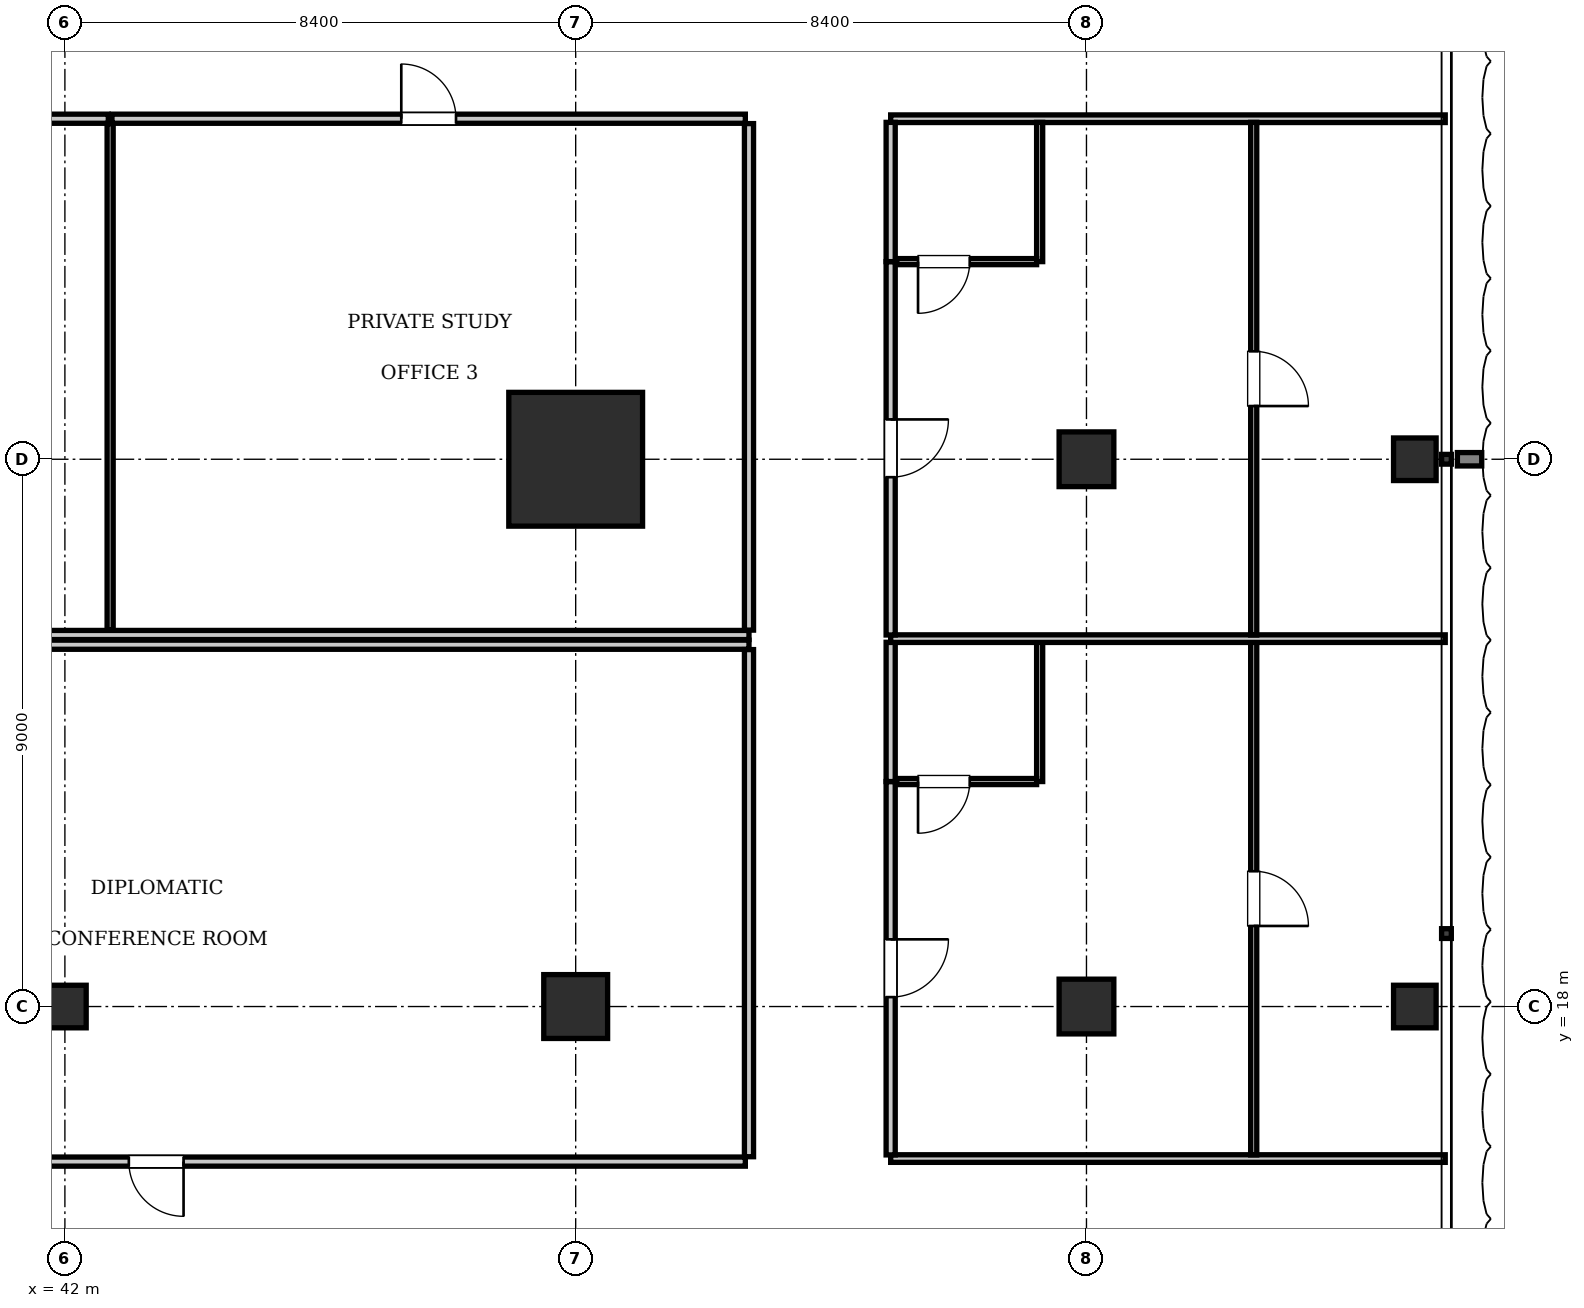
"""IFC4 building model, lengths in metres.
Left out: names, types, materials, properties, quantities, classifications, styles, units other than length and angle.
Written with IfcOpenShell. Run it as: python <this file> out.ifc"""

import sys

from ifc_helpers import new_model, si_unit, direction, frame, frame_2d, origin, origin_2d, place, context, subcontext, project, spatial, rectangle, i_section, extrude, element, fill, save


model = new_model("IFC4")
c1 = context("Model", 3, precision=1e-05, world=origin(), true_north=direction((0.0, 1.0)))
c2 = subcontext(c1, "Body", "Model", "MODEL_VIEW")
j1 = project(units=[si_unit("LENGTHUNIT", "METRE"), si_unit("PLANEANGLEUNIT", "RADIAN")], contexts=[c1])
p1 = place(None, origin())
s1 = spatial("IfcSite", under=j1, at=p1, CompositionType="ELEMENT")
p2 = place(p1, origin())
s2 = spatial("IfcBuilding", under=s1, at=p2, CompositionType="ELEMENT")
p3 = place(p2, frame((0.0, 0.0, 65.45)))
s3 = spatial("IfcBuildingStorey", under=s2, at=p3, CompositionType="ELEMENT", Elevation=65.45)
p4 = place(p3, frame((50.4, 27.0, 0.0), z_axis=(0.0, 0.0, 1.0), x_axis=(1.0, 0.0, 0.0)))
e1 = element("IfcColumn", 1, at=p4, inside=s3, PredefinedType="COLUMN", context=c2, shape_type="SweptSolid", body=[
    extrude(rectangle(XDim=2.2, YDim=2.2, at=origin_2d()), origin(), (0.0, 0.0, 1.0), 3.85),
])
p5 = place(p3, frame((50.4, 18.0, 0.0), z_axis=(0.0, 0.0, 1.0), x_axis=(1.0, 0.0, 0.0)))
e2 = element("IfcColumn", 2, at=p5, inside=s3, PredefinedType="COLUMN", context=c2, shape_type="SweptSolid", body=[
    extrude(rectangle(XDim=1.05, YDim=1.05, at=origin_2d()), origin(), (0.0, 0.0, 1.0), 3.85),
])
p6 = place(p3, frame((42.0, 18.0, 0.0), z_axis=(0.0, 0.0, 1.0), x_axis=(1.0, 0.0, 0.0)))
e3 = element("IfcColumn", 3, at=p6, inside=s3, PredefinedType="COLUMN", context=c2, shape_type="SweptSolid", body=[
    extrude(i_section(OverallWidth=0.7, OverallDepth=0.7, WebThickness=0.028, FlangeThickness=0.044, at=origin_2d()), origin(), (0.0, 0.0, 1.0), 3.85),
])
for number, where, z_axis, x_axis in (
    (4, (58.8, 18.0, 0.0), (0.0, 0.0, 1.0), (1.0, 0.0, 0.0)),
    (5, (58.8, 27.0, 0.0), (0.0, 0.0, 1.0), (1.0, 0.0, 0.0)),
):
    element("IfcColumn", number, at=place(p3, frame(where, z_axis=z_axis, x_axis=x_axis)), inside=s3, PredefinedType="COLUMN", context=c2, shape_type="SweptSolid", body=[
        extrude(rectangle(XDim=0.9, YDim=0.9, at=origin_2d()), origin(), (0.0, 0.0, 1.0), 3.85),
    ])
for number, where, z_axis, x_axis in (
    (6, (64.2, 18.0, 0.0), (0.0, 0.0, 1.0), (1.0, 0.0, 0.0)),
    (7, (64.2, 27.0, 0.0), (0.0, 0.0, 1.0), (1.0, 0.0, 0.0)),
):
    element("IfcColumn", number, at=place(p3, frame(where, z_axis=z_axis, x_axis=x_axis)), inside=s3, PredefinedType="COLUMN", context=c2, shape_type="SweptSolid", body=[
        extrude(i_section(OverallWidth=0.7, OverallDepth=0.7, WebThickness=0.028, FlangeThickness=0.044, at=origin_2d()), origin(), (0.0, 0.0, 1.0), 3.85),
    ])
p7 = place(p3, frame((22.35, 24.11, 0.0), z_axis=(0.0, 0.0, 1.0), x_axis=(1.0, 0.0, 0.0)))
e8 = element("IfcWall", 8, at=p7, inside=s3, PredefinedType="PARTITIONING", context=c2, shape_type="SweptSolid", body=[
    extrude(rectangle(XDim=30.9, YDim=0.15, at=frame_2d((15.45, 0.0))), origin(), (0.0, 0.0, 1.0), 3.61),
])
p8 = place(p3, frame((53.25, 24.19, 0.0), z_axis=(0.0, 0.0, 1.0), x_axis=(0.0, 1.0, 0.0)))
e9 = element("IfcWall", 9, at=p8, inside=s3, PredefinedType="PARTITIONING", context=c2, shape_type="SweptSolid", body=[
    extrude(rectangle(XDim=8.33, YDim=0.15, at=frame_2d((4.165, 0.0))), origin(), (0.0, 0.0, 1.0), 3.61),
])
p9 = place(p3, frame((34.122, 32.6, 0.0), z_axis=(0.0, 0.0, 1.0), x_axis=(1.0, 0.0, 0.0)))
e10 = element("IfcWall", 10, at=p9, inside=s3, PredefinedType="PARTITIONING", context=c2, shape_type="SweptSolid", body=[
    extrude(rectangle(XDim=8.592, YDim=0.15, at=frame_2d((4.296, 0.0))), origin(), (0.0, 0.0, 1.0), 3.61),
])
p10 = place(p9, frame((3.846, 0.0, 0.0)))
e11 = element("IfcOpeningElement", 11, at=p10, cuts=e10, PredefinedType="OPENING", context=c2, shape_type="SweptSolid", body=[
    extrude(rectangle(XDim=0.9, YDim=2.1, at=frame_2d((0.45, 1.05))), frame((0.0, 0.085, 0.0), z_axis=(0.0, -1.0, 0.0), x_axis=(1.0, 0.0, 0.0)), (0.0, 0.0, 1.0), 0.17),
])
p11 = place(p3, frame((42.744, 24.19, 0.0), z_axis=(0.0, 0.0, 1.0), x_axis=(0.0, 1.0, 0.0)))
e12 = element("IfcWall", 12, at=p11, inside=s3, PredefinedType="PARTITIONING", context=c2, shape_type="SweptSolid", body=[
    extrude(rectangle(XDim=8.33, YDim=0.1, at=frame_2d((4.165, 0.0))), origin(), (0.0, 0.0, 1.0), 3.61),
])
p12 = place(p3, frame((42.774, 32.6, 0.0), z_axis=(0.0, 0.0, 1.0), x_axis=(1.0, 0.0, 0.0)))
e13 = element("IfcWall", 13, at=p12, inside=s3, PredefinedType="PARTITIONING", context=c2, shape_type="SweptSolid", body=[
    extrude(rectangle(XDim=10.416, YDim=0.15, at=frame_2d((5.208, 0.0))), origin(), (0.0, 0.0, 1.0), 3.61),
])
p13 = place(p12, frame((4.758, 0.0, 0.0)))
e14 = element("IfcOpeningElement", 14, at=p13, cuts=e13, PredefinedType="OPENING", context=c2, shape_type="SweptSolid", body=[
    extrude(rectangle(XDim=0.9, YDim=2.1, at=frame_2d((0.45, 1.05))), frame((0.0, 0.085, 0.0), z_axis=(0.0, -1.0, 0.0), x_axis=(1.0, 0.0, 0.0)), (0.0, 0.0, 1.0), 0.17),
])
p14 = place(p3, frame((22.35, 23.95, 0.0), z_axis=(0.0, 0.0, 1.0), x_axis=(1.0, 0.0, 0.0)))
e15 = element("IfcWall", 15, at=p14, inside=s3, PredefinedType="PARTITIONING", context=c2, shape_type="SweptSolid", body=[
    extrude(rectangle(XDim=30.9, YDim=0.15, at=frame_2d((15.45, 0.0))), origin(), (0.0, 0.0, 1.0), 3.61),
])
p15 = place(p3, frame((53.25, 15.53, 0.0), z_axis=(0.0, 0.0, 1.0), x_axis=(0.0, 1.0, 0.0)))
e16 = element("IfcWall", 16, at=p15, inside=s3, PredefinedType="PARTITIONING", context=c2, shape_type="SweptSolid", body=[
    extrude(rectangle(XDim=8.34, YDim=0.15, at=frame_2d((4.17, 0.0))), origin(), (0.0, 0.0, 1.0), 3.61),
])
p16 = place(p3, frame((33.813, 15.45, 0.0), z_axis=(0.0, 0.0, 1.0), x_axis=(1.0, 0.0, 0.0)))
e17 = element("IfcWall", 17, at=p16, inside=s3, PredefinedType="PARTITIONING", context=c2, shape_type="SweptSolid", body=[
    extrude(rectangle(XDim=19.377, YDim=0.15, at=frame_2d((9.688, 0.0))), origin(), (0.0, 0.0, 1.0), 3.61),
])
p17 = place(p16, frame((9.239, 0.0, 0.0)))
e18 = element("IfcOpeningElement", 18, at=p17, cuts=e17, PredefinedType="OPENING", context=c2, shape_type="SweptSolid", body=[
    extrude(rectangle(XDim=0.9, YDim=2.1, at=frame_2d((0.45, 1.05))), frame((0.0, 0.085, 0.0), z_axis=(0.0, -1.0, 0.0), x_axis=(1.0, 0.0, 0.0)), (0.0, 0.0, 1.0), 0.17),
])
for number, where, z_axis, x_axis in (
    (19, (55.58, 15.5, 0.0), (0.0, 0.0, 1.0), (1.0, 0.0, 0.0)),
    (20, (55.58, 32.6, 0.0), (0.0, 0.0, 1.0), (1.0, 0.0, 0.0)),
):
    element("IfcWall", number, at=place(p3, frame(where, z_axis=z_axis, x_axis=x_axis)), inside=s3, PredefinedType="PARTITIONING", context=c2, shape_type="SweptSolid", body=[
        extrude(rectangle(XDim=9.12, YDim=0.125, at=frame_2d((4.56, 0.0))), origin(), (0.0, 0.0, 1.0), 3.61),
    ])
p18 = place(p3, frame((55.58, 15.56, 0.0), z_axis=(0.0, 0.0, 1.0), x_axis=(0.0, 1.0, 0.0)))
e21 = element("IfcWall", 21, at=p18, inside=s3, PredefinedType="PARTITIONING", context=c2, shape_type="SweptSolid", body=[
    extrude(rectangle(XDim=6.14, YDim=0.15, at=frame_2d((3.07, 0.0))), origin(), (0.0, 0.0, 1.0), 3.61),
])
p19 = place(p18, frame((2.595, 0.0, 0.0)))
e22 = element("IfcOpeningElement", 22, at=p19, cuts=e21, PredefinedType="OPENING", context=c2, shape_type="SweptSolid", body=[
    extrude(rectangle(XDim=0.95, YDim=2.15, at=frame_2d((0.475, 1.075))), frame((0.0, 0.085, 0.0), z_axis=(0.0, -1.0, 0.0), x_axis=(1.0, 0.0, 0.0)), (0.0, 0.0, 1.0), 0.17),
])
p20 = place(p3, frame((55.58, 21.7, 0.0), z_axis=(0.0, 0.0, 1.0), x_axis=(0.0, 1.0, 0.0)))
e23 = element("IfcWall", 23, at=p20, inside=s3, PredefinedType="PARTITIONING", context=c2, shape_type="SweptSolid", body=[
    extrude(rectangle(XDim=2.29, YDim=0.15, at=frame_2d((1.145, 0.0))), origin(), (0.0, 0.0, 1.0), 3.61),
])
p21 = place(p3, frame((58.03, 21.7, 0.0), z_axis=(0.0, 0.0, 1.0), x_axis=(0.0, 1.0, 0.0)))
e24 = element("IfcWall", 24, at=p21, inside=s3, PredefinedType="PARTITIONING", context=c2, shape_type="SweptSolid", body=[
    extrude(rectangle(XDim=2.29, YDim=0.1, at=frame_2d((1.145, 0.0))), origin(), (0.0, 0.0, 1.0), 3.61),
])
p22 = place(p3, frame((55.68, 21.7, 0.0), z_axis=(0.0, 0.0, 1.0), x_axis=(1.0, 0.0, 0.0)))
e25 = element("IfcWall", 25, at=p22, inside=s3, PredefinedType="PARTITIONING", context=c2, shape_type="SweptSolid", body=[
    extrude(rectangle(XDim=2.3, YDim=0.1, at=frame_2d((1.15, 0.0))), origin(), (0.0, 0.0, 1.0), 3.61),
])
p23 = place(p22, frame((0.35, 0.0, 0.0)))
e26 = element("IfcOpeningElement", 26, at=p23, cuts=e25, PredefinedType="OPENING", context=c2, shape_type="SweptSolid", body=[
    extrude(rectangle(XDim=0.85, YDim=2.1, at=frame_2d((0.425, 1.05))), frame((0.0, 0.06, 0.0), z_axis=(0.0, -1.0, 0.0), x_axis=(1.0, 0.0, 0.0)), (0.0, 0.0, 1.0), 0.12),
])
p24 = place(p3, frame((61.55, 15.56, 0.0), z_axis=(0.0, 0.0, 1.0), x_axis=(0.0, 1.0, 0.0)))
e27 = element("IfcWall", 27, at=p24, inside=s3, PredefinedType="PARTITIONING", context=c2, shape_type="SweptSolid", body=[
    extrude(rectangle(XDim=8.43, YDim=0.1, at=frame_2d((4.215, 0.0))), origin(), (0.0, 0.0, 1.0), 3.352),
])
p25 = place(p24, frame((3.765, 0.0, 0.0)))
e28 = element("IfcOpeningElement", 28, at=p25, cuts=e27, PredefinedType="OPENING", context=c2, shape_type="SweptSolid", body=[
    extrude(rectangle(XDim=0.9, YDim=2.1, at=frame_2d((0.45, 1.05))), frame((0.0, 0.06, 0.0), z_axis=(0.0, -1.0, 0.0), x_axis=(1.0, 0.0, 0.0)), (0.0, 0.0, 1.0), 0.12),
])
p26 = place(p3, frame((55.58, 24.05, 0.0), z_axis=(0.0, 0.0, 1.0), x_axis=(1.0, 0.0, 0.0)))
e29 = element("IfcWall", 29, at=p26, inside=s3, PredefinedType="PARTITIONING", context=c2, shape_type="SweptSolid", body=[
    extrude(rectangle(XDim=9.12, YDim=0.125, at=frame_2d((4.56, 0.0))), origin(), (0.0, 0.0, 1.0), 3.61),
])
p27 = place(p3, frame((55.58, 24.11, 0.0), z_axis=(0.0, 0.0, 1.0), x_axis=(0.0, 1.0, 0.0)))
e30 = element("IfcWall", 30, at=p27, inside=s3, PredefinedType="PARTITIONING", context=c2, shape_type="SweptSolid", body=[
    extrude(rectangle(XDim=6.14, YDim=0.15, at=frame_2d((3.07, 0.0))), origin(), (0.0, 0.0, 1.0), 3.61),
])
p28 = place(p27, frame((2.595, 0.0, 0.0)))
e31 = element("IfcOpeningElement", 31, at=p28, cuts=e30, PredefinedType="OPENING", context=c2, shape_type="SweptSolid", body=[
    extrude(rectangle(XDim=0.95, YDim=2.15, at=frame_2d((0.475, 1.075))), frame((0.0, 0.085, 0.0), z_axis=(0.0, -1.0, 0.0), x_axis=(1.0, 0.0, 0.0)), (0.0, 0.0, 1.0), 0.17),
])
p29 = place(p3, frame((55.58, 30.25, 0.0), z_axis=(0.0, 0.0, 1.0), x_axis=(0.0, 1.0, 0.0)))
e32 = element("IfcWall", 32, at=p29, inside=s3, PredefinedType="PARTITIONING", context=c2, shape_type="SweptSolid", body=[
    extrude(rectangle(XDim=2.29, YDim=0.15, at=frame_2d((1.145, 0.0))), origin(), (0.0, 0.0, 1.0), 3.61),
])
p30 = place(p3, frame((58.03, 30.25, 0.0), z_axis=(0.0, 0.0, 1.0), x_axis=(0.0, 1.0, 0.0)))
e33 = element("IfcWall", 33, at=p30, inside=s3, PredefinedType="PARTITIONING", context=c2, shape_type="SweptSolid", body=[
    extrude(rectangle(XDim=2.29, YDim=0.1, at=frame_2d((1.145, 0.0))), origin(), (0.0, 0.0, 1.0), 3.61),
])
p31 = place(p3, frame((55.68, 30.25, 0.0), z_axis=(0.0, 0.0, 1.0), x_axis=(1.0, 0.0, 0.0)))
e34 = element("IfcWall", 34, at=p31, inside=s3, PredefinedType="PARTITIONING", context=c2, shape_type="SweptSolid", body=[
    extrude(rectangle(XDim=2.3, YDim=0.1, at=frame_2d((1.15, 0.0))), origin(), (0.0, 0.0, 1.0), 3.61),
])
p32 = place(p31, frame((0.35, 0.0, 0.0)))
e35 = element("IfcOpeningElement", 35, at=p32, cuts=e34, PredefinedType="OPENING", context=c2, shape_type="SweptSolid", body=[
    extrude(rectangle(XDim=0.85, YDim=2.1, at=frame_2d((0.425, 1.05))), frame((0.0, 0.06, 0.0), z_axis=(0.0, -1.0, 0.0), x_axis=(1.0, 0.0, 0.0)), (0.0, 0.0, 1.0), 0.12),
])
p33 = place(p3, frame((61.55, 24.11, 0.0), z_axis=(0.0, 0.0, 1.0), x_axis=(0.0, 1.0, 0.0)))
e36 = element("IfcWall", 36, at=p33, inside=s3, PredefinedType="PARTITIONING", context=c2, shape_type="SweptSolid", body=[
    extrude(rectangle(XDim=8.43, YDim=0.1, at=frame_2d((4.215, 0.0))), origin(), (0.0, 0.0, 1.0), 3.403),
])
p34 = place(p33, frame((3.765, 0.0, 0.0)))
e37 = element("IfcOpeningElement", 37, at=p34, cuts=e36, PredefinedType="OPENING", context=c2, shape_type="SweptSolid", body=[
    extrude(rectangle(XDim=0.9, YDim=2.1, at=frame_2d((0.45, 1.05))), frame((0.0, 0.06, 0.0), z_axis=(0.0, -1.0, 0.0), x_axis=(1.0, 0.0, 0.0)), (0.0, 0.0, 1.0), 0.12),
])
p35 = place(p13, origin())
e38 = element("IfcDoor", 38, at=p35, inside=s3, OperationType="SINGLE_SWING_LEFT", PredefinedType="DOOR", context=c2, shape_type="SweptSolid", body=[
    extrude(rectangle(XDim=0.9, YDim=2.1, at=frame_2d((0.45, 1.05))), frame((0.0, 0.025, 0.0), z_axis=(0.0, -1.0, 0.0), x_axis=(1.0, 0.0, 0.0)), (0.0, 0.0, 1.0), 0.05),
])
fill(e14, e38)
p36 = place(p17, frame((0.9, 0.0, 0.0), z_axis=(0.0, 0.0, 1.0), x_axis=(-1.0, 0.0, 0.0)))
e39 = element("IfcDoor", 39, at=p36, inside=s3, OperationType="SINGLE_SWING_LEFT", PredefinedType="DOOR", context=c2, shape_type="SweptSolid", body=[
    extrude(rectangle(XDim=0.9, YDim=2.1, at=frame_2d((0.45, 1.05))), frame((0.0, 0.025, 0.0), z_axis=(0.0, -1.0, 0.0), x_axis=(1.0, 0.0, 0.0)), (0.0, 0.0, 1.0), 0.05),
])
fill(e18, e39)
p37 = place(p23, frame((0.85, 0.0, 0.0), z_axis=(0.0, 0.0, 1.0), x_axis=(-1.0, 0.0, 0.0)))
e40 = element("IfcDoor", 40, at=p37, inside=s3, OperationType="SINGLE_SWING_RIGHT", PredefinedType="DOOR", context=c2, shape_type="SweptSolid", body=[
    extrude(rectangle(XDim=0.85, YDim=2.1, at=frame_2d((0.425, 1.05))), frame((0.0, 0.025, 0.0), z_axis=(0.0, -1.0, 0.0), x_axis=(1.0, 0.0, 0.0)), (0.0, 0.0, 1.0), 0.05),
])
fill(e26, e40)
p38 = place(p19, frame((0.95, 0.0, 0.0), z_axis=(0.0, 0.0, 1.0), x_axis=(-1.0, 0.0, 0.0)))
e41 = element("IfcDoor", 41, at=p38, inside=s3, OperationType="SINGLE_SWING_LEFT", PredefinedType="DOOR", context=c2, shape_type="SweptSolid", body=[
    extrude(rectangle(XDim=0.95, YDim=2.15, at=frame_2d((0.475, 1.075))), frame((0.0, 0.025, 0.0), z_axis=(0.0, -1.0, 0.0), x_axis=(1.0, 0.0, 0.0)), (0.0, 0.0, 1.0), 0.05),
])
fill(e22, e41)
p39 = place(p25, frame((0.9, 0.0, 0.0), z_axis=(0.0, 0.0, 1.0), x_axis=(-1.0, 0.0, 0.0)))
e42 = element("IfcDoor", 42, at=p39, inside=s3, OperationType="SINGLE_SWING_RIGHT", PredefinedType="DOOR", context=c2, shape_type="SweptSolid", body=[
    extrude(rectangle(XDim=0.9, YDim=2.1, at=frame_2d((0.45, 1.05))), frame((0.0, 0.025, 0.0), z_axis=(0.0, -1.0, 0.0), x_axis=(1.0, 0.0, 0.0)), (0.0, 0.0, 1.0), 0.05),
])
fill(e28, e42)
p40 = place(p32, frame((0.85, 0.0, 0.0), z_axis=(0.0, 0.0, 1.0), x_axis=(-1.0, 0.0, 0.0)))
e43 = element("IfcDoor", 43, at=p40, inside=s3, OperationType="SINGLE_SWING_RIGHT", PredefinedType="DOOR", context=c2, shape_type="SweptSolid", body=[
    extrude(rectangle(XDim=0.85, YDim=2.1, at=frame_2d((0.425, 1.05))), frame((0.0, 0.025, 0.0), z_axis=(0.0, -1.0, 0.0), x_axis=(1.0, 0.0, 0.0)), (0.0, 0.0, 1.0), 0.05),
])
fill(e35, e43)
p41 = place(p28, frame((0.95, 0.0, 0.0), z_axis=(0.0, 0.0, 1.0), x_axis=(-1.0, 0.0, 0.0)))
e44 = element("IfcDoor", 44, at=p41, inside=s3, OperationType="SINGLE_SWING_LEFT", PredefinedType="DOOR", context=c2, shape_type="SweptSolid", body=[
    extrude(rectangle(XDim=0.95, YDim=2.15, at=frame_2d((0.475, 1.075))), frame((0.0, 0.025, 0.0), z_axis=(0.0, -1.0, 0.0), x_axis=(1.0, 0.0, 0.0)), (0.0, 0.0, 1.0), 0.05),
])
fill(e31, e44)
p42 = place(p34, frame((0.9, 0.0, 0.0), z_axis=(0.0, 0.0, 1.0), x_axis=(-1.0, 0.0, 0.0)))
e45 = element("IfcDoor", 45, at=p42, inside=s3, OperationType="SINGLE_SWING_RIGHT", PredefinedType="DOOR", context=c2, shape_type="SweptSolid", body=[
    extrude(rectangle(XDim=0.9, YDim=2.1, at=frame_2d((0.45, 1.05))), frame((0.0, 0.025, 0.0), z_axis=(0.0, -1.0, 0.0), x_axis=(1.0, 0.0, 0.0)), (0.0, 0.0, 1.0), 0.05),
])
fill(e37, e45)
save(model, sys.argv[1])
